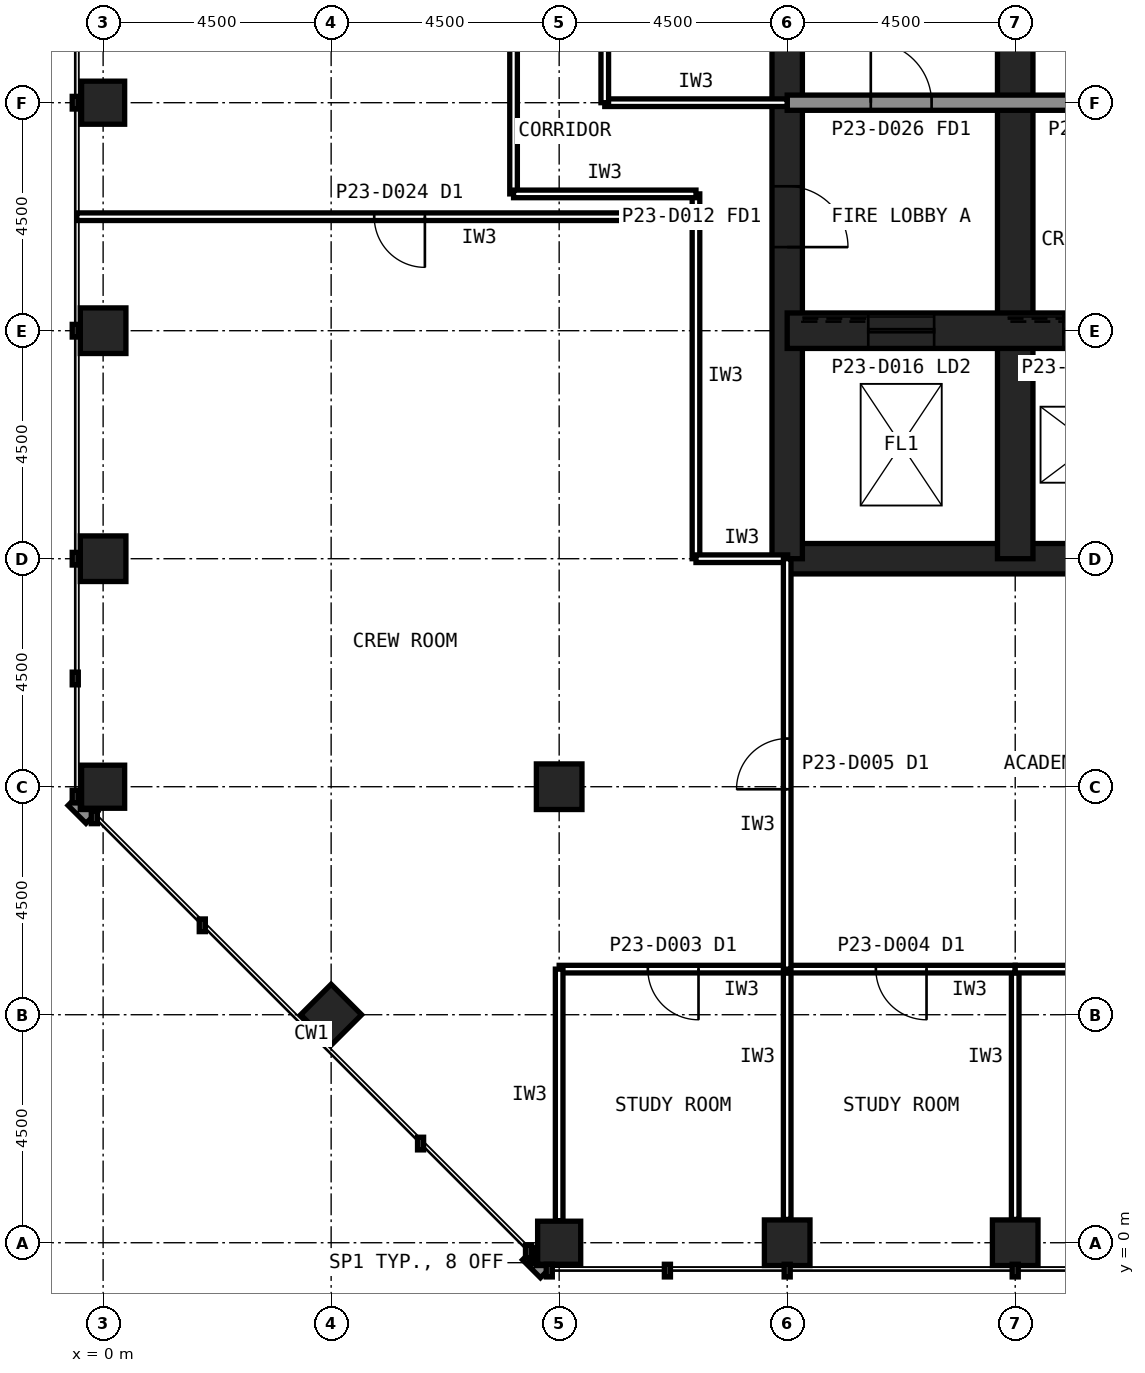
"""IFC4 building model, lengths in metres.
Left out: names, types, materials, properties, quantities, classifications, styles, units other than length and angle.
Written with IfcOpenShell. Run it as: python <this file> out.ifc"""

import sys

from ifc_helpers import new_model, si_unit, direction, frame, frame_2d, origin, origin_2d, place, context, subcontext, project, spatial, rectangle, hollow_rectangle, extrude, element, fill, save


model = new_model("IFC4")
c1 = context("Model", 3, precision=1e-05, world=origin(), true_north=direction((0.0, 1.0)))
c2 = subcontext(c1, "Body", "Model", "MODEL_VIEW")
j1 = project(units=[si_unit("LENGTHUNIT", "METRE"), si_unit("PLANEANGLEUNIT", "RADIAN")], contexts=[c1])
p1 = place(None, origin())
s1 = spatial("IfcSite", under=j1, at=p1, CompositionType="ELEMENT")
p2 = place(p1, origin())
s2 = spatial("IfcBuilding", under=s1, at=p2, CompositionType="ELEMENT")
p3 = place(p2, frame((0.0, 0.0, 96.2)))
s3 = spatial("IfcBuildingStorey", under=s2, at=p3, CompositionType="ELEMENT", Elevation=96.2)
p4 = place(p3, frame((9.0, 0.0, 0.0), z_axis=(0.0, 0.0, 1.0), x_axis=(1.0, 0.0, 0.0)))
e1 = element("IfcColumn", 1, at=p4, inside=s3, PredefinedType="COLUMN", context=c2, shape_type="SweptSolid", body=[
    extrude(hollow_rectangle(XDim=0.8, YDim=0.8, WallThickness=0.045, at=origin_2d()), origin(), (0.0, 0.0, 1.0), 4.2),
])
p5 = place(p3, frame((13.5, 0.0, 0.0), z_axis=(0.0, 0.0, 1.0), x_axis=(1.0, 0.0, 0.0)))
e2 = element("IfcColumn", 2, at=p5, inside=s3, PredefinedType="COLUMN", context=c2, shape_type="SweptSolid", body=[
    extrude(hollow_rectangle(XDim=0.85, YDim=0.85, WallThickness=0.05, at=origin_2d()), origin(), (0.0, 0.0, 1.0), 4.2),
])
p6 = place(p3, frame((18.0, 0.0, 0.0), z_axis=(0.0, 0.0, 1.0), x_axis=(1.0, 0.0, 0.0)))
e3 = element("IfcColumn", 3, at=p6, inside=s3, PredefinedType="COLUMN", context=c2, shape_type="SweptSolid", body=[
    extrude(hollow_rectangle(XDim=0.9, YDim=0.9, WallThickness=0.063, at=origin_2d()), origin(), (0.0, 0.0, 1.0), 4.2),
])
p7 = place(p3, frame((0.0, 22.5, 0.0), z_axis=(0.0, 0.0, 1.0), x_axis=(1.0, 0.0, 0.0)))
e4 = element("IfcColumn", 4, at=p7, inside=s3, PredefinedType="COLUMN", context=c2, shape_type="SweptSolid", body=[
    extrude(hollow_rectangle(XDim=0.8, YDim=0.8, WallThickness=0.045, at=origin_2d()), origin(), (0.0, 0.0, 1.0), 4.2),
])
p8 = place(p3, frame((0.0, 18.0, 0.0), z_axis=(0.0, 0.0, 1.0), x_axis=(1.0, 0.0, 0.0)))
e5 = element("IfcColumn", 5, at=p8, inside=s3, PredefinedType="COLUMN", context=c2, shape_type="SweptSolid", body=[
    extrude(hollow_rectangle(XDim=0.9, YDim=0.9, WallThickness=0.063, at=origin_2d()), origin(), (0.0, 0.0, 1.0), 4.2),
])
p9 = place(p3, frame((0.0, 13.5, 0.0), z_axis=(0.0, 0.0, 1.0), x_axis=(1.0, 0.0, 0.0)))
e6 = element("IfcColumn", 6, at=p9, inside=s3, PredefinedType="COLUMN", context=c2, shape_type="SweptSolid", body=[
    extrude(hollow_rectangle(XDim=0.85, YDim=0.85, WallThickness=0.05, at=origin_2d()), origin(), (0.0, 0.0, 1.0), 4.2),
])
for number, where, z_axis, x_axis in (
    (7, (0.0, 9.0, 0.0), (0.0, 0.0, 1.0), (1.0, 0.0, 0.0)),
    (8, (4.5, 4.5, 0.0), (0.0, 0.0, 1.0), (0.707, 0.707, 0.0)),
):
    element("IfcColumn", number, at=place(p3, frame(where, z_axis=z_axis, x_axis=x_axis)), inside=s3, PredefinedType="COLUMN", context=c2, shape_type="SweptSolid", body=[
        extrude(hollow_rectangle(XDim=0.8, YDim=0.8, WallThickness=0.045, at=origin_2d()), origin(), (0.0, 0.0, 1.0), 4.2),
    ])
p10 = place(p3, frame((9.0, 9.0, 0.0), z_axis=(0.0, 0.0, 1.0), x_axis=(1.0, 0.0, 0.0)))
e9 = element("IfcColumn", 9, at=p10, inside=s3, PredefinedType="COLUMN", context=c2, shape_type="SweptSolid", body=[
    extrude(hollow_rectangle(XDim=0.9, YDim=0.9, WallThickness=0.063, at=origin_2d()), origin(), (0.0, 0.0, 1.0), 4.2),
])
p11 = place(p3, frame((13.5, 13.5, 0.0), z_axis=(0.0, 0.0, 1.0), x_axis=(1.0, 0.0, 0.0)))
e10 = element("IfcWall", 10, at=p11, inside=s3, PredefinedType="SHEAR", context=c2, shape_type="SweptSolid", body=[
    extrude(rectangle(XDim=27.0, YDim=0.6, at=frame_2d((13.5, 0.0))), origin(), (0.0, 0.0, 1.0), 4.2),
])
p12 = place(p3, frame((13.5, 40.5, 0.0), z_axis=(0.0, 0.0, 1.0), x_axis=(0.0, -1.0, 0.0)))
e11 = element("IfcWall", 11, at=p12, inside=s3, PredefinedType="SHEAR", context=c2, shape_type="SweptSolid", body=[
    extrude(rectangle(XDim=27.0, YDim=0.6, at=frame_2d((13.5, 0.0))), origin(), (0.0, 0.0, 1.0), 4.2),
])
p13 = place(p12, frame((19.65, 0.0, 0.0)))
e12 = element("IfcOpeningElement", 12, at=p13, cuts=e11, PredefinedType="OPENING", context=c2, shape_type="SweptSolid", body=[
    extrude(rectangle(XDim=1.2, YDim=2.1, at=frame_2d((0.6, 1.05))), frame((0.0, 0.31, 0.0), z_axis=(0.0, -1.0, 0.0), x_axis=(1.0, 0.0, 0.0)), (0.0, 0.0, 1.0), 0.62),
])
p14 = place(p12, frame((5.85, 0.0, 0.0)))
e13 = element("IfcOpeningElement", 13, at=p14, cuts=e11, PredefinedType="OPENING", context=c2, shape_type="SweptSolid", body=[
    extrude(rectangle(XDim=1.8, YDim=2.1, at=frame_2d((0.9, 1.05))), frame((0.0, 0.31, 0.0), z_axis=(0.0, -1.0, 0.0), x_axis=(1.0, 0.0, 0.0)), (0.0, 0.0, 1.0), 0.62),
])
p15 = place(p3, frame((18.0, 13.5, 0.0), z_axis=(0.0, 0.0, 1.0), x_axis=(0.0, 1.0, 0.0)))
e14 = element("IfcWall", 14, at=p15, inside=s3, PredefinedType="SHEAR", context=c2, shape_type="SweptSolid", body=[
    extrude(rectangle(XDim=18.0, YDim=0.7, at=frame_2d((9.0, 0.0))), origin(), (0.0, 0.0, 1.0), 4.2),
])
p16 = place(p3, frame((13.5, 18.0, 0.0), z_axis=(0.0, 0.0, 1.0), x_axis=(1.0, 0.0, 0.0)))
e15 = element("IfcWall", 15, at=p16, inside=s3, PredefinedType="SHEAR", context=c2, shape_type="SweptSolid", body=[
    extrude(rectangle(XDim=27.0, YDim=0.7, at=frame_2d((13.5, 0.0))), origin(), (0.0, 0.0, 1.0), 4.2),
])
p17 = place(p16, frame((24.3, 0.0, 0.0)))
e16 = element("IfcOpeningElement", 16, at=p17, cuts=e15, PredefinedType="OPENING", context=c2, shape_type="SweptSolid", body=[
    extrude(rectangle(XDim=0.9, YDim=2.1, at=frame_2d((0.45, 1.05))), frame((0.0, 0.36, 0.0), z_axis=(0.0, -1.0, 0.0), x_axis=(1.0, 0.0, 0.0)), (0.0, 0.0, 1.0), 0.72),
])
p18 = place(p16, frame((5.45, 0.0, 0.0)))
e17 = element("IfcOpeningElement", 17, at=p18, cuts=e15, PredefinedType="OPENING", context=c2, shape_type="SweptSolid", body=[
    extrude(rectangle(XDim=1.1, YDim=2.1, at=frame_2d((0.55, 1.05))), frame((0.0, 0.36, 0.0), z_axis=(0.0, -1.0, 0.0), x_axis=(1.0, 0.0, 0.0)), (0.0, 0.0, 1.0), 0.72),
])
p19 = place(p16, frame((8.45, 0.0, 0.0)))
e18 = element("IfcOpeningElement", 18, at=p19, cuts=e15, PredefinedType="OPENING", context=c2, shape_type="SweptSolid", body=[
    extrude(rectangle(XDim=1.1, YDim=2.1, at=frame_2d((0.55, 1.05))), frame((0.0, 0.36, 0.0), z_axis=(0.0, -1.0, 0.0), x_axis=(1.0, 0.0, 0.0)), (0.0, 0.0, 1.0), 0.72),
])
p20 = place(p16, frame((11.45, 0.0, 0.0)))
e19 = element("IfcOpeningElement", 19, at=p20, cuts=e15, PredefinedType="OPENING", context=c2, shape_type="SweptSolid", body=[
    extrude(rectangle(XDim=1.1, YDim=2.1, at=frame_2d((0.55, 1.05))), frame((0.0, 0.36, 0.0), z_axis=(0.0, -1.0, 0.0), x_axis=(1.0, 0.0, 0.0)), (0.0, 0.0, 1.0), 0.72),
])
p21 = place(p16, frame((14.45, 0.0, 0.0)))
e20 = element("IfcOpeningElement", 20, at=p21, cuts=e15, PredefinedType="OPENING", context=c2, shape_type="SweptSolid", body=[
    extrude(rectangle(XDim=1.1, YDim=2.1, at=frame_2d((0.55, 1.05))), frame((0.0, 0.36, 0.0), z_axis=(0.0, -1.0, 0.0), x_axis=(1.0, 0.0, 0.0)), (0.0, 0.0, 1.0), 0.72),
])
p22 = place(p16, frame((17.45, 0.0, 0.0)))
e21 = element("IfcOpeningElement", 21, at=p22, cuts=e15, PredefinedType="OPENING", context=c2, shape_type="SweptSolid", body=[
    extrude(rectangle(XDim=1.1, YDim=2.1, at=frame_2d((0.55, 1.05))), frame((0.0, 0.36, 0.0), z_axis=(0.0, -1.0, 0.0), x_axis=(1.0, 0.0, 0.0)), (0.0, 0.0, 1.0), 0.72),
])
p23 = place(p16, frame((20.45, 0.0, 0.0)))
e22 = element("IfcOpeningElement", 22, at=p23, cuts=e15, PredefinedType="OPENING", context=c2, shape_type="SweptSolid", body=[
    extrude(rectangle(XDim=1.1, YDim=2.1, at=frame_2d((0.55, 1.05))), frame((0.0, 0.36, 0.0), z_axis=(0.0, -1.0, 0.0), x_axis=(1.0, 0.0, 0.0)), (0.0, 0.0, 1.0), 0.72),
])
p24 = place(p16, frame((1.6, 0.0, 0.0)))
e23 = element("IfcOpeningElement", 23, at=p24, cuts=e15, PredefinedType="OPENING", context=c2, shape_type="SweptSolid", body=[
    extrude(rectangle(XDim=1.3, YDim=2.2, at=frame_2d((0.65, 1.1))), frame((0.0, 0.36, 0.0), z_axis=(0.0, -1.0, 0.0), x_axis=(1.0, 0.0, 0.0)), (0.0, 0.0, 1.0), 0.72),
])
p25 = place(p3, frame((13.5, 22.5, 0.0), z_axis=(0.0, 0.0, 1.0), x_axis=(1.0, 0.0, 0.0)))
e24 = element("IfcWall", 24, at=p25, inside=s3, PredefinedType="SOLIDWALL", context=c2, shape_type="SweptSolid", body=[
    extrude(rectangle(XDim=27.0, YDim=0.3, at=frame_2d((13.5, 0.0))), origin(), (0.0, 0.0, 1.0), 4.04),
])
p26 = place(p25, frame((1.65, 0.0, 0.0)))
e25 = element("IfcOpeningElement", 25, at=p26, cuts=e24, PredefinedType="OPENING", context=c2, shape_type="SweptSolid", body=[
    extrude(rectangle(XDim=1.2, YDim=2.1, at=frame_2d((0.6, 1.05))), frame((0.0, 0.16, 0.0), z_axis=(0.0, -1.0, 0.0), x_axis=(1.0, 0.0, 0.0)), (0.0, 0.0, 1.0), 0.32),
])
p27 = place(p25, frame((6.025, 0.0, 0.0)))
e26 = element("IfcOpeningElement", 26, at=p27, cuts=e24, PredefinedType="OPENING", context=c2, shape_type="SweptSolid", body=[
    extrude(rectangle(XDim=1.0, YDim=2.1, at=frame_2d((0.5, 1.05))), frame((0.0, 0.16, 0.0), z_axis=(0.0, -1.0, 0.0), x_axis=(1.0, 0.0, 0.0)), (0.0, 0.0, 1.0), 0.32),
])
p28 = place(p25, frame((10.525, 0.0, 0.0)))
e27 = element("IfcOpeningElement", 27, at=p28, cuts=e24, PredefinedType="OPENING", context=c2, shape_type="SweptSolid", body=[
    extrude(rectangle(XDim=1.0, YDim=2.1, at=frame_2d((0.5, 1.05))), frame((0.0, 0.16, 0.0), z_axis=(0.0, -1.0, 0.0), x_axis=(1.0, 0.0, 0.0)), (0.0, 0.0, 1.0), 0.32),
])
p29 = place(p25, frame((19.75, 0.0, 0.0)))
e28 = element("IfcOpeningElement", 28, at=p29, cuts=e24, PredefinedType="OPENING", context=c2, shape_type="SweptSolid", body=[
    extrude(rectangle(XDim=1.0, YDim=2.1, at=frame_2d((0.5, 1.05))), frame((0.0, 0.16, 0.0), z_axis=(0.0, -1.0, 0.0), x_axis=(1.0, 0.0, 0.0)), (0.0, 0.0, 1.0), 0.32),
])
p30 = place(p25, frame((15.05, 0.0, 0.0)))
e29 = element("IfcOpeningElement", 29, at=p30, cuts=e24, PredefinedType="OPENING", context=c2, shape_type="SweptSolid", body=[
    extrude(rectangle(XDim=1.4, YDim=2.4, at=frame_2d((0.7, 1.2))), frame((0.0, 0.16, 0.0), z_axis=(0.0, -1.0, 0.0), x_axis=(1.0, 0.0, 0.0)), (0.0, 0.0, 1.0), 0.32),
])
p31 = place(p3, frame((8.1, 33.3, 0.0), z_axis=(0.0, 0.0, 1.0), x_axis=(0.0, -1.0, 0.0)))
e30 = element("IfcWall", 30, at=p31, inside=s3, PredefinedType="PARTITIONING", context=c2, shape_type="SweptSolid", body=[
    extrude(rectangle(XDim=12.6, YDim=0.15, at=frame_2d((6.3, 0.0))), origin(), (0.0, 0.0, 1.0), 4.04),
])
p32 = place(p31, frame((5.8, 0.0, 0.0)))
e31 = element("IfcOpeningElement", 31, at=p32, cuts=e30, PredefinedType="OPENING", context=c2, shape_type="SweptSolid", body=[
    extrude(rectangle(XDim=1.0, YDim=2.1, at=frame_2d((0.5, 1.05))), frame((0.0, 0.085, 0.0), z_axis=(0.0, -1.0, 0.0), x_axis=(1.0, 0.0, 0.0)), (0.0, 0.0, 1.0), 0.17),
])
p33 = place(p3, frame((11.7, 20.7, 0.0), z_axis=(0.0, 0.0, 1.0), x_axis=(0.0, -1.0, 0.0)))
e32 = element("IfcWall", 32, at=p33, inside=s3, PredefinedType="PARTITIONING", context=c2, shape_type="SweptSolid", body=[
    extrude(rectangle(XDim=7.2, YDim=0.15, at=frame_2d((3.6, 0.0))), origin(), (0.0, 0.0, 1.0), 4.04),
])
p34 = place(p3, frame((8.1, 20.7, 0.0), z_axis=(0.0, 0.0, 1.0), x_axis=(1.0, 0.0, 0.0)))
e33 = element("IfcWall", 33, at=p34, inside=s3, PredefinedType="PARTITIONING", context=c2, shape_type="SweptSolid", body=[
    extrude(rectangle(XDim=3.6, YDim=0.15, at=frame_2d((1.8, 0.0))), origin(), (0.0, 0.0, 1.0), 4.04),
])
p35 = place(p3, frame((11.7, 13.5, 0.0), z_axis=(0.0, 0.0, 1.0), x_axis=(1.0, 0.0, 0.0)))
e34 = element("IfcWall", 34, at=p35, inside=s3, PredefinedType="PARTITIONING", context=c2, shape_type="SweptSolid", body=[
    extrude(rectangle(XDim=1.81, YDim=0.15, at=frame_2d((0.905, 0.0))), origin(), (0.0, 0.0, 1.0), 3.189),
])
p36 = place(p3, frame((13.5, 0.435, 0.0), z_axis=(0.0, 0.0, 1.0), x_axis=(0.0, 1.0, 0.0)))
e35 = element("IfcWall", 35, at=p36, inside=s3, PredefinedType="PARTITIONING", context=c2, shape_type="SweptSolid", body=[
    extrude(rectangle(XDim=4.965, YDim=0.15, at=frame_2d((2.482, 0.0))), origin(), (0.0, 0.0, 1.0), 3.189),
])
p37 = place(p3, frame((13.5, 5.4, 0.0), z_axis=(0.0, 0.0, 1.0), x_axis=(-1.0, 0.0, 0.0)))
e36 = element("IfcWall", 36, at=p37, inside=s3, PredefinedType="PARTITIONING", context=c2, shape_type="SweptSolid", body=[
    extrude(rectangle(XDim=4.5, YDim=0.15, at=frame_2d((2.25, 0.0))), origin(), (0.0, 0.0, 1.0), 4.04),
])
p38 = place(p37, frame((1.75, 0.0, 0.0)))
e37 = element("IfcOpeningElement", 37, at=p38, cuts=e36, PredefinedType="OPENING", context=c2, shape_type="SweptSolid", body=[
    extrude(rectangle(XDim=1.0, YDim=2.1, at=frame_2d((0.5, 1.05))), frame((0.0, 0.085, 0.0), z_axis=(0.0, -1.0, 0.0), x_axis=(1.0, 0.0, 0.0)), (0.0, 0.0, 1.0), 0.17),
])
p39 = place(p3, frame((9.0, 5.4, 0.0), z_axis=(0.0, 0.0, 1.0), x_axis=(0.0, -1.0, 0.0)))
e38 = element("IfcWall", 38, at=p39, inside=s3, PredefinedType="PARTITIONING", context=c2, shape_type="SweptSolid", body=[
    extrude(rectangle(XDim=4.99, YDim=0.15, at=frame_2d((2.495, 0.0))), origin(), (0.0, 0.0, 1.0), 3.429),
])
p40 = place(p3, frame((18.0, 0.46, 0.0), z_axis=(0.0, 0.0, 1.0), x_axis=(0.0, 1.0, 0.0)))
e39 = element("IfcWall", 39, at=p40, inside=s3, PredefinedType="PARTITIONING", context=c2, shape_type="SweptSolid", body=[
    extrude(rectangle(XDim=4.94, YDim=0.15, at=frame_2d((2.47, 0.0))), origin(), (0.0, 0.0, 1.0), 3.189),
])
p41 = place(p3, frame((18.0, 5.4, 0.0), z_axis=(0.0, 0.0, 1.0), x_axis=(-1.0, 0.0, 0.0)))
e40 = element("IfcWall", 40, at=p41, inside=s3, PredefinedType="PARTITIONING", context=c2, shape_type="SweptSolid", body=[
    extrude(rectangle(XDim=4.5, YDim=0.15, at=frame_2d((2.25, 0.0))), origin(), (0.0, 0.0, 1.0), 4.04),
])
p42 = place(p41, frame((1.75, 0.0, 0.0)))
e41 = element("IfcOpeningElement", 41, at=p42, cuts=e40, PredefinedType="OPENING", context=c2, shape_type="SweptSolid", body=[
    extrude(rectangle(XDim=1.0, YDim=2.1, at=frame_2d((0.5, 1.05))), frame((0.0, 0.085, 0.0), z_axis=(0.0, -1.0, 0.0), x_axis=(1.0, 0.0, 0.0)), (0.0, 0.0, 1.0), 0.17),
])
p43 = place(p3, frame((22.5, 5.4, 0.0), z_axis=(0.0, 0.0, 1.0), x_axis=(-1.0, 0.0, 0.0)))
e42 = element("IfcWall", 42, at=p43, inside=s3, PredefinedType="PARTITIONING", context=c2, shape_type="SweptSolid", body=[
    extrude(rectangle(XDim=4.5, YDim=0.15, at=frame_2d((2.25, 0.0))), origin(), (0.0, 0.0, 1.0), 4.04),
])
p44 = place(p43, frame((1.75, 0.0, 0.0)))
e43 = element("IfcOpeningElement", 43, at=p44, cuts=e42, PredefinedType="OPENING", context=c2, shape_type="SweptSolid", body=[
    extrude(rectangle(XDim=1.0, YDim=2.1, at=frame_2d((0.5, 1.05))), frame((0.0, 0.085, 0.0), z_axis=(0.0, -1.0, 0.0), x_axis=(1.0, 0.0, 0.0)), (0.0, 0.0, 1.0), 0.17),
])
p45 = place(p3, frame((9.9, 22.5, 0.0), z_axis=(0.0, 0.0, 1.0), x_axis=(1.0, 0.0, 0.0)))
e44 = element("IfcWall", 44, at=p45, inside=s3, PredefinedType="PARTITIONING", context=c2, shape_type="SweptSolid", body=[
    extrude(rectangle(XDim=3.6, YDim=0.15, at=frame_2d((1.8, 0.0))), origin(), (0.0, 0.0, 1.0), 3.189),
])
p46 = place(p3, frame((9.9, 31.5, 0.0), z_axis=(0.0, 0.0, 1.0), x_axis=(0.0, -1.0, 0.0)))
e45 = element("IfcWall", 45, at=p46, inside=s3, PredefinedType="PARTITIONING", context=c2, shape_type="SweptSolid", body=[
    extrude(rectangle(XDim=9.0, YDim=0.15, at=frame_2d((4.5, 0.0))), origin(), (0.0, 0.0, 1.0), 4.04),
])
p47 = place(p3, frame((13.5, 5.4, 0.0), z_axis=(0.0, 0.0, 1.0), x_axis=(0.0, 1.0, 0.0)))
e46 = element("IfcWall", 46, at=p47, inside=s3, PredefinedType="PARTITIONING", context=c2, shape_type="SweptSolid", body=[
    extrude(rectangle(XDim=8.1, YDim=0.15, at=frame_2d((4.05, 0.0))), origin(), (0.0, 0.0, 1.0), 3.189),
])
p48 = place(p47, frame((3.55, 0.0, 0.0)))
e47 = element("IfcOpeningElement", 47, at=p48, cuts=e46, PredefinedType="OPENING", context=c2, shape_type="SweptSolid", body=[
    extrude(rectangle(XDim=1.0, YDim=2.1, at=frame_2d((0.5, 1.05))), frame((0.0, 0.085, 0.0), z_axis=(0.0, -1.0, 0.0), x_axis=(1.0, 0.0, 0.0)), (0.0, 0.0, 1.0), 0.17),
])
p49 = place(p3, frame((11.7, 20.25, 0.0), z_axis=(0.0, 0.0, 1.0), x_axis=(-1.0, 0.0, 0.0)))
e48 = element("IfcWall", 48, at=p49, inside=s3, PredefinedType="PARTITIONING", context=c2, shape_type="SweptSolid", body=[
    extrude(rectangle(XDim=12.22, YDim=0.15, at=frame_2d((6.11, 0.0))), origin(), (0.0, 0.0, 1.0), 4.04),
])
p50 = place(p49, frame((5.35, 0.0, 0.0)))
e49 = element("IfcOpeningElement", 49, at=p50, cuts=e48, PredefinedType="OPENING", context=c2, shape_type="SweptSolid", body=[
    extrude(rectangle(XDim=1.0, YDim=2.1, at=frame_2d((0.5, 1.05))), frame((0.0, 0.085, 0.0), z_axis=(0.0, -1.0, 0.0), x_axis=(1.0, 0.0, 0.0)), (0.0, 0.0, 1.0), 0.17),
])
p51 = place(p13, origin())
e50 = element("IfcDoor", 50, at=p51, inside=s3, OperationType="SINGLE_SWING_RIGHT", PredefinedType="DOOR", context=c2, shape_type="SweptSolid", body=[
    extrude(rectangle(XDim=1.2, YDim=2.1, at=frame_2d((0.6, 1.05))), frame((0.0, 0.025, 0.0), z_axis=(0.0, -1.0, 0.0), x_axis=(1.0, 0.0, 0.0)), (0.0, 0.0, 1.0), 0.05),
])
fill(e12, e50)
p52 = place(p26, origin())
e51 = element("IfcDoor", 51, at=p52, inside=s3, OperationType="SINGLE_SWING_LEFT", PredefinedType="DOOR", context=c2, shape_type="SweptSolid", body=[
    extrude(rectangle(XDim=1.2, YDim=2.1, at=frame_2d((0.6, 1.05))), frame((0.0, 0.025, 0.0), z_axis=(0.0, -1.0, 0.0), x_axis=(1.0, 0.0, 0.0)), (0.0, 0.0, 1.0), 0.05),
])
fill(e25, e51)
p53 = place(p18, origin())
e52 = element("IfcDoor", 52, at=p53, inside=s3, OperationType="SLIDING_TO_LEFT", PredefinedType="DOOR", context=c2, shape_type="SweptSolid", body=[
    extrude(rectangle(XDim=1.1, YDim=2.1, at=frame_2d((0.55, 1.05))), frame((0.0, 0.025, 0.0), z_axis=(0.0, -1.0, 0.0), x_axis=(1.0, 0.0, 0.0)), (0.0, 0.0, 1.0), 0.05),
])
fill(e17, e52)
p54 = place(p24, origin())
e53 = element("IfcDoor", 53, at=p54, inside=s3, OperationType="SLIDING_TO_LEFT", PredefinedType="DOOR", context=c2, shape_type="SweptSolid", body=[
    extrude(rectangle(XDim=1.3, YDim=2.2, at=frame_2d((0.65, 1.1))), frame((0.0, 0.025, 0.0), z_axis=(0.0, -1.0, 0.0), x_axis=(1.0, 0.0, 0.0)), (0.0, 0.0, 1.0), 0.05),
])
fill(e23, e53)
p55 = place(p38, origin())
e54 = element("IfcDoor", 54, at=p55, inside=s3, OperationType="SINGLE_SWING_LEFT", PredefinedType="DOOR", context=c2, shape_type="SweptSolid", body=[
    extrude(rectangle(XDim=1.0, YDim=2.1, at=frame_2d((0.5, 1.05))), frame((0.0, 0.025, 0.0), z_axis=(0.0, -1.0, 0.0), x_axis=(1.0, 0.0, 0.0)), (0.0, 0.0, 1.0), 0.05),
])
fill(e37, e54)
p56 = place(p42, origin())
e55 = element("IfcDoor", 55, at=p56, inside=s3, OperationType="SINGLE_SWING_LEFT", PredefinedType="DOOR", context=c2, shape_type="SweptSolid", body=[
    extrude(rectangle(XDim=1.0, YDim=2.1, at=frame_2d((0.5, 1.05))), frame((0.0, 0.025, 0.0), z_axis=(0.0, -1.0, 0.0), x_axis=(1.0, 0.0, 0.0)), (0.0, 0.0, 1.0), 0.05),
])
fill(e41, e55)
p57 = place(p48, origin())
e56 = element("IfcDoor", 56, at=p57, inside=s3, OperationType="SINGLE_SWING_LEFT", PredefinedType="DOOR", context=c2, shape_type="SweptSolid", body=[
    extrude(rectangle(XDim=1.0, YDim=2.1, at=frame_2d((0.5, 1.05))), frame((0.0, 0.025, 0.0), z_axis=(0.0, -1.0, 0.0), x_axis=(1.0, 0.0, 0.0)), (0.0, 0.0, 1.0), 0.05),
])
fill(e47, e56)
p58 = place(p50, origin())
e57 = element("IfcDoor", 57, at=p58, inside=s3, OperationType="SINGLE_SWING_LEFT", PredefinedType="DOOR", context=c2, shape_type="SweptSolid", body=[
    extrude(rectangle(XDim=1.0, YDim=2.1, at=frame_2d((0.5, 1.05))), frame((0.0, 0.025, 0.0), z_axis=(0.0, -1.0, 0.0), x_axis=(1.0, 0.0, 0.0)), (0.0, 0.0, 1.0), 0.05),
])
fill(e49, e57)
save(model, sys.argv[1])
